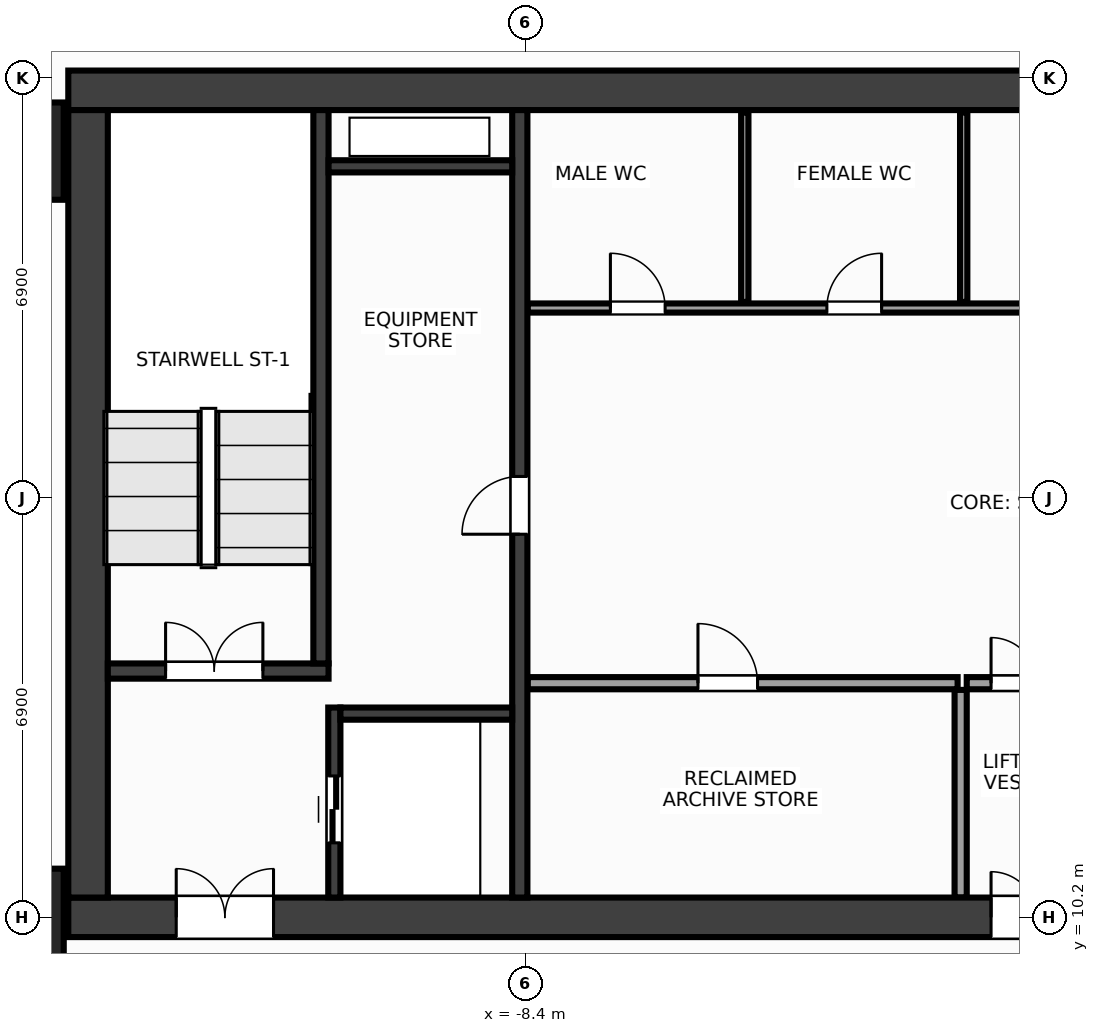
"""IFC4 building model, lengths in metres.
Left out: names, types, materials, properties, quantities, classifications, styles, units other than length and angle.
Written with IfcOpenShell. Run it as: python <this file> out.ifc"""

import sys

from ifc_helpers import new_model, si_unit, direction, frame, frame_2d, origin, origin_2d, place, context, subcontext, project, spatial, rectangle, extrude, source, transform, mapped, element, fill, save


model = new_model("IFC4")
c1 = context("Model", 3, precision=1e-05, world=origin(), true_north=direction((0.0, 1.0)))
c2 = subcontext(c1, "Body", "Model", "MODEL_VIEW")
j1 = project(units=[si_unit("LENGTHUNIT", "METRE"), si_unit("PLANEANGLEUNIT", "RADIAN")], contexts=[c1])
p1 = place(None, origin())
s1 = spatial("IfcSite", under=j1, at=p1, CompositionType="ELEMENT")
p2 = place(p1, origin())
s2 = spatial("IfcBuilding", under=s1, at=p2, CompositionType="ELEMENT")
p3 = place(p2, frame((0.0, 0.0, 110.0)))
s3 = spatial("IfcBuildingStorey", under=s2, at=p3, CompositionType="ELEMENT", Elevation=110.0)
m1 = source(origin(), c2, "Body", "SweptSolid", [
    extrude(rectangle(XDim=31.85, YDim=0.65, at=frame_2d((15.925, 0.0))), origin(), (0.0, 0.0, 1.0), 3.6),
])
p4 = place(p3, frame((-15.925, 23.8, 0.0), z_axis=(0.0, 0.0, 1.0), x_axis=(1.0, 0.0, 0.0)))
e1 = element("IfcWall", 1, at=p4, inside=s3, PredefinedType="SHEAR", context=c2, shape_type="MappedRepresentation", body=[
    mapped(m1, transform((0.0, 0.0, 0.0), x_axis=(1.0, 0.0, 0.0), y_axis=(0.0, 1.0, 0.0), z_axis=(0.0, 0.0, 1.0), scale=1.0)),
])
p5 = place(p3, frame((-15.925, 10.2, 0.0), z_axis=(0.0, 0.0, 1.0), x_axis=(1.0, 0.0, 0.0)))
e2 = element("IfcWall", 2, at=p5, inside=s3, PredefinedType="SHEAR", context=c2, shape_type="MappedRepresentation", body=[
    mapped(m1, transform((0.0, 0.0, 0.0), x_axis=(1.0, 0.0, 0.0), y_axis=(0.0, 1.0, 0.0), z_axis=(0.0, 0.0, 1.0), scale=1.0)),
])
p6 = place(p5, frame((1.775, 0.0, 0.0)))
e3 = element("IfcOpeningElement", 3, at=p6, cuts=e2, PredefinedType="OPENING", context=c2, shape_type="SweptSolid", body=[
    extrude(rectangle(XDim=1.6, YDim=2.15, at=frame_2d((0.8, 1.075))), frame((0.0, 0.337, 0.0), z_axis=(0.0, -1.0, 0.0), x_axis=(1.0, 0.0, 0.0)), (0.0, 0.0, 1.0), 0.674),
])
p7 = place(p5, frame((28.475, 0.0, 0.0)))
e4 = element("IfcOpeningElement", 4, at=p7, cuts=e2, PredefinedType="OPENING", context=c2, shape_type="SweptSolid", body=[
    extrude(rectangle(XDim=1.6, YDim=2.15, at=frame_2d((0.8, 1.075))), frame((0.0, 0.337, 0.0), z_axis=(0.0, -1.0, 0.0), x_axis=(1.0, 0.0, 0.0)), (0.0, 0.0, 1.0), 0.674),
])
p8 = place(p5, frame((15.175, 0.0, 0.0)))
e5 = element("IfcOpeningElement", 5, at=p8, cuts=e2, PredefinedType="OPENING", context=c2, shape_type="SweptSolid", body=[
    extrude(rectangle(XDim=1.5, YDim=2.2, at=frame_2d((0.75, 1.1))), frame((0.0, 0.337, 0.0), z_axis=(0.0, -1.0, 0.0), x_axis=(1.0, 0.0, 0.0)), (0.0, 0.0, 1.0), 0.674),
])
m2 = source(origin(), c2, "Body", "SweptSolid", [
    extrude(rectangle(XDim=12.95, YDim=0.65, at=frame_2d((6.475, 0.0))), origin(), (0.0, 0.0, 1.0), 3.6),
])
p9 = place(p3, frame((-15.6, 10.525, 0.0), z_axis=(0.0, 0.0, 1.0), x_axis=(0.0, 1.0, 0.0)))
e6 = element("IfcWall", 6, at=p9, inside=s3, PredefinedType="SHEAR", context=c2, shape_type="MappedRepresentation", body=[
    mapped(m2, transform((0.0, 0.0, 0.0), x_axis=(1.0, 0.0, 0.0), y_axis=(0.0, 1.0, 0.0), z_axis=(0.0, 0.0, 1.0), scale=1.0)),
])
m3 = source(origin(), c2, "Body", "SweptSolid", [
    extrude(rectangle(XDim=12.95, YDim=0.25, at=frame_2d((6.475, 0.0))), origin(), (0.0, 0.0, 1.0), 3.6),
])
p10 = place(p3, frame((-8.5, 10.525, 0.0), z_axis=(0.0, 0.0, 1.0), x_axis=(0.0, 1.0, 0.0)))
e7 = element("IfcWall", 7, at=p10, inside=s3, PredefinedType="SHEAR", context=c2, shape_type="MappedRepresentation", body=[
    mapped(m3, transform((0.0, 0.0, 0.0), x_axis=(1.0, 0.0, 0.0), y_axis=(0.0, 1.0, 0.0), z_axis=(0.0, 0.0, 1.0), scale=1.0)),
])
p11 = place(p10, frame((5.975, 0.0, 0.0)))
e8 = element("IfcOpeningElement", 8, at=p11, cuts=e7, PredefinedType="OPENING", context=c2, shape_type="SweptSolid", body=[
    extrude(rectangle(XDim=0.95, YDim=2.15, at=frame_2d((0.475, 1.075))), frame((0.0, 0.137, 0.0), z_axis=(0.0, -1.0, 0.0), x_axis=(1.0, 0.0, 0.0)), (0.0, 0.0, 1.0), 0.274),
])
m4 = source(origin(), c2, "Body", "SweptSolid", [
    extrude(rectangle(XDim=3.63, YDim=0.25, at=frame_2d((1.815, 0.0))), origin(), (0.0, 0.0, 1.0), 3.6),
])
p12 = place(p3, frame((-15.275, 14.25, 0.0), z_axis=(0.0, 0.0, 1.0), x_axis=(1.0, 0.0, 0.0)))
e9 = element("IfcWall", 9, at=p12, inside=s3, PredefinedType="SHEAR", context=c2, shape_type="MappedRepresentation", body=[
    mapped(m4, transform((0.0, 0.0, 0.0), x_axis=(1.0, 0.0, 0.0), y_axis=(0.0, 1.0, 0.0), z_axis=(0.0, 0.0, 1.0), scale=1.0)),
])
p13 = place(p12, frame((0.95, 0.0, 0.0)))
e10 = element("IfcOpeningElement", 10, at=p13, cuts=e9, PredefinedType="OPENING", context=c2, shape_type="SweptSolid", body=[
    extrude(rectangle(XDim=1.6, YDim=2.15, at=frame_2d((0.8, 1.075))), frame((0.0, 0.137, 0.0), z_axis=(0.0, -1.0, 0.0), x_axis=(1.0, 0.0, 0.0)), (0.0, 0.0, 1.0), 0.274),
])
m5 = source(origin(), c2, "Body", "SweptSolid", [
    extrude(rectangle(XDim=9.1, YDim=0.25, at=frame_2d((4.55, 0.0))), origin(), (0.0, 0.0, 1.0), 3.6),
])
p14 = place(p3, frame((-11.77, 14.375, 0.0), z_axis=(0.0, 0.0, 1.0), x_axis=(0.0, 1.0, 0.0)))
e11 = element("IfcWall", 11, at=p14, inside=s3, PredefinedType="SHEAR", context=c2, shape_type="MappedRepresentation", body=[
    mapped(m5, transform((0.0, 0.0, 0.0), x_axis=(1.0, 0.0, 0.0), y_axis=(0.0, 1.0, 0.0), z_axis=(0.0, 0.0, 1.0), scale=1.0)),
])
m6 = source(origin(), c2, "Body", "SweptSolid", [
    extrude(rectangle(XDim=3.125, YDim=0.2, at=frame_2d((1.562, 0.0))), origin(), (0.0, 0.0, 1.0), 3.6),
])
p15 = place(p3, frame((-11.55, 10.525, 0.0), z_axis=(0.0, 0.0, 1.0), x_axis=(0.0, 1.0, 0.0)))
e12 = element("IfcWall", 12, at=p15, inside=s3, PredefinedType="SHEAR", context=c2, shape_type="MappedRepresentation", body=[
    mapped(m6, transform((0.0, 0.0, 0.0), x_axis=(1.0, 0.0, 0.0), y_axis=(0.0, 1.0, 0.0), z_axis=(0.0, 0.0, 1.0), scale=1.0)),
])
p16 = place(p15, frame((0.9, 0.0, 0.0)))
e13 = element("IfcOpeningElement", 13, at=p16, cuts=e12, PredefinedType="OPENING", context=c2, shape_type="SweptSolid", body=[
    extrude(rectangle(XDim=1.1, YDim=2.15, at=frame_2d((0.55, 1.075))), frame((0.0, 0.112, 0.0), z_axis=(0.0, -1.0, 0.0), x_axis=(1.0, 0.0, 0.0)), (0.0, 0.0, 1.0), 0.224),
])
m7 = source(origin(), c2, "Body", "SweptSolid", [
    extrude(rectangle(XDim=2.825, YDim=0.2, at=frame_2d((1.413, 0.0))), origin(), (0.0, 0.0, 1.0), 3.6),
])
p17 = place(p3, frame((-11.45, 13.55, 0.0), z_axis=(0.0, 0.0, 1.0), x_axis=(1.0, 0.0, 0.0)))
e14 = element("IfcWall", 14, at=p17, inside=s3, PredefinedType="SHEAR", context=c2, shape_type="MappedRepresentation", body=[
    mapped(m7, transform((0.0, 0.0, 0.0), x_axis=(1.0, 0.0, 0.0), y_axis=(0.0, 1.0, 0.0), z_axis=(0.0, 0.0, 1.0), scale=1.0)),
])
m8 = source(origin(), c2, "Body", "SweptSolid", [
    extrude(rectangle(XDim=3.02, YDim=0.2, at=frame_2d((1.51, 0.0))), origin(), (0.0, 0.0, 1.0), 3.6),
])
p18 = place(p3, frame((-11.645, 22.55, 0.0), z_axis=(0.0, 0.0, 1.0), x_axis=(1.0, 0.0, 0.0)))
e15 = element("IfcWall", 15, at=p18, inside=s3, PredefinedType="SHEAR", context=c2, shape_type="MappedRepresentation", body=[
    mapped(m8, transform((0.0, 0.0, 0.0), x_axis=(1.0, 0.0, 0.0), y_axis=(0.0, 1.0, 0.0), z_axis=(0.0, 0.0, 1.0), scale=1.0)),
])
m9 = source(origin(), c2, "Body", "SweptSolid", [
    extrude(rectangle(XDim=1.6, YDim=1.6, at=origin_2d()), origin(), (0.0, 0.0, 1.0), 3.6),
])
for number, where, z_axis, x_axis in (
    (16, (-16.8, 10.2, 0.0), (0.0, 0.0, 1.0), (1.0, 0.0, 0.0)),
    (17, (-16.8, 22.8, 0.0), (0.0, 0.0, 1.0), (1.0, 0.0, 0.0)),
):
    element("IfcColumn", number, at=place(p3, frame(where, z_axis=z_axis, x_axis=x_axis)), inside=s3, PredefinedType="COLUMN", context=c2, shape_type="MappedRepresentation", body=[
        mapped(m9, transform((0.0, 0.0, 0.0), x_axis=(1.0, 0.0, 0.0), y_axis=(0.0, 1.0, 0.0), z_axis=(0.0, 0.0, 1.0), scale=1.0)),
    ])
m10 = source(origin(), c2, "Body", "SweptSolid", [
    extrude(rectangle(XDim=7.07, YDim=0.2, at=frame_2d((3.535, 0.0))), origin(), (0.0, 0.0, 1.0), 3.36),
])
p19 = place(p3, frame((-8.37, 14.05, 0.0), z_axis=(0.0, 0.0, 1.0), x_axis=(1.0, 0.0, 0.0)))
e18 = element("IfcWall", 18, at=p19, inside=s3, PredefinedType="PARTITIONING", context=c2, shape_type="MappedRepresentation", body=[
    mapped(m10, transform((0.0, 0.0, 0.0), x_axis=(1.0, 0.0, 0.0), y_axis=(0.0, 1.0, 0.0), z_axis=(0.0, 0.0, 1.0), scale=1.0)),
])
p20 = place(p19, frame((2.8, 0.0, 0.0)))
e19 = element("IfcOpeningElement", 19, at=p20, cuts=e18, PredefinedType="OPENING", context=c2, shape_type="SweptSolid", body=[
    extrude(rectangle(XDim=0.98, YDim=2.15, at=frame_2d((0.49, 1.075))), frame((0.0, 0.112, 0.0), z_axis=(0.0, -1.0, 0.0), x_axis=(1.0, 0.0, 0.0)), (0.0, 0.0, 1.0), 0.224),
])
m11 = source(origin(), c2, "Body", "SweptSolid", [
    extrude(rectangle(XDim=3.415, YDim=0.2, at=frame_2d((1.708, 0.0))), origin(), (0.0, 0.0, 1.0), 3.36),
])
p21 = place(p3, frame((-1.25, 10.525, 0.0), z_axis=(0.0, 0.0, 1.0), x_axis=(0.0, 1.0, 0.0)))
e20 = element("IfcWall", 20, at=p21, inside=s3, PredefinedType="PARTITIONING", context=c2, shape_type="MappedRepresentation", body=[
    mapped(m11, transform((0.0, 0.0, 0.0), x_axis=(1.0, 0.0, 0.0), y_axis=(0.0, 1.0, 0.0), z_axis=(0.0, 0.0, 1.0), scale=1.0)),
])
m12 = source(origin(), c2, "Body", "SweptSolid", [
    extrude(rectangle(XDim=2.3, YDim=0.2, at=frame_2d((1.15, 0.0))), origin(), (0.0, 0.0, 1.0), 3.36),
])
p22 = place(p3, frame((-1.15, 14.05, 0.0), z_axis=(0.0, 0.0, 1.0), x_axis=(1.0, 0.0, 0.0)))
e21 = element("IfcWall", 21, at=p22, inside=s3, PredefinedType="PARTITIONING", context=c2, shape_type="MappedRepresentation", body=[
    mapped(m12, transform((0.0, 0.0, 0.0), x_axis=(1.0, 0.0, 0.0), y_axis=(0.0, 1.0, 0.0), z_axis=(0.0, 0.0, 1.0), scale=1.0)),
])
p23 = place(p22, frame((0.4, 0.0, 0.0)))
e22 = element("IfcOpeningElement", 22, at=p23, cuts=e21, PredefinedType="OPENING", context=c2, shape_type="SweptSolid", body=[
    extrude(rectangle(XDim=1.5, YDim=2.2, at=frame_2d((0.75, 1.1))), frame((0.0, 0.112, 0.0), z_axis=(0.0, -1.0, 0.0), x_axis=(1.0, 0.0, 0.0)), (0.0, 0.0, 1.0), 0.224),
])
m13 = source(origin(), c2, "Body", "SweptSolid", [
    extrude(rectangle(XDim=14.59, YDim=0.15, at=frame_2d((7.295, 0.0))), origin(), (0.0, 0.0, 1.0), 3.36),
])
p24 = place(p3, frame((-8.37, 20.22, 0.0), z_axis=(0.0, 0.0, 1.0), x_axis=(1.0, 0.0, 0.0)))
e23 = element("IfcWall", 23, at=p24, inside=s3, PredefinedType="PARTITIONING", context=c2, shape_type="MappedRepresentation", body=[
    mapped(m13, transform((0.0, 0.0, 0.0), x_axis=(1.0, 0.0, 0.0), y_axis=(0.0, 1.0, 0.0), z_axis=(0.0, 0.0, 1.0), scale=1.0)),
])
p25 = place(p24, frame((1.36, 0.0, 0.0)))
e24 = element("IfcOpeningElement", 24, at=p25, cuts=e23, PredefinedType="OPENING", context=c2, shape_type="SweptSolid", body=[
    extrude(rectangle(XDim=0.9, YDim=2.15, at=frame_2d((0.45, 1.075))), frame((0.0, 0.087, 0.0), z_axis=(0.0, -1.0, 0.0), x_axis=(1.0, 0.0, 0.0)), (0.0, 0.0, 1.0), 0.174),
])
p26 = place(p24, frame((4.92, 0.0, 0.0)))
e25 = element("IfcOpeningElement", 25, at=p26, cuts=e23, PredefinedType="OPENING", context=c2, shape_type="SweptSolid", body=[
    extrude(rectangle(XDim=0.9, YDim=2.15, at=frame_2d((0.45, 1.075))), frame((0.0, 0.087, 0.0), z_axis=(0.0, -1.0, 0.0), x_axis=(1.0, 0.0, 0.0)), (0.0, 0.0, 1.0), 0.174),
])
p27 = place(p24, frame((10.37, 0.0, 0.0)))
e26 = element("IfcOpeningElement", 26, at=p27, cuts=e23, PredefinedType="OPENING", context=c2, shape_type="SweptSolid", body=[
    extrude(rectangle(XDim=0.9, YDim=2.15, at=frame_2d((0.45, 1.075))), frame((0.0, 0.087, 0.0), z_axis=(0.0, -1.0, 0.0), x_axis=(1.0, 0.0, 0.0)), (0.0, 0.0, 1.0), 0.174),
])
m14 = source(origin(), c2, "Body", "SweptSolid", [
    extrude(rectangle(XDim=3.115, YDim=0.12, at=frame_2d((1.558, 0.0))), origin(), (0.0, 0.0, 1.0), 3.36),
])
for number, where, z_axis, x_axis in (
    (27, (-4.8, 20.32, 0.0), (0.0, 0.0, 1.0), (0.0, 1.0, 0.0)),
    (28, (-1.2, 20.32, 0.0), (0.0, 0.0, 1.0), (0.0, 1.0, 0.0)),
):
    element("IfcWall", number, at=place(p3, frame(where, z_axis=z_axis, x_axis=x_axis)), inside=s3, PredefinedType="PARTITIONING", context=c2, shape_type="MappedRepresentation", body=[
        mapped(m14, transform((0.0, 0.0, 0.0), x_axis=(1.0, 0.0, 0.0), y_axis=(0.0, 1.0, 0.0), z_axis=(0.0, 0.0, 1.0), scale=1.0)),
    ])
m15 = source(origin(), c2, "Body", "SweptSolid", [
    extrude(rectangle(XDim=1.6, YDim=2.15, at=frame_2d((0.8, 1.075))), frame((0.0, 0.025, 0.0), z_axis=(0.0, -1.0, 0.0), x_axis=(1.0, 0.0, 0.0)), (0.0, 0.0, 1.0), 0.05),
])
p28 = place(p13, origin())
e29 = element("IfcDoor", 29, at=p28, inside=s3, OperationType="DOUBLE_DOOR_SINGLE_SWING", PredefinedType="DOOR", context=c2, shape_type="MappedRepresentation", body=[
    mapped(m15, transform((0.0, 0.0, 0.0), x_axis=(1.0, 0.0, 0.0), y_axis=(0.0, 1.0, 0.0), z_axis=(0.0, 0.0, 1.0), scale=1.0)),
])
fill(e10, e29)
p29 = place(p6, origin())
e30 = element("IfcDoor", 30, at=p29, inside=s3, OperationType="DOUBLE_DOOR_SINGLE_SWING", PredefinedType="DOOR", context=c2, shape_type="MappedRepresentation", body=[
    mapped(m15, transform((0.0, 0.0, 0.0), x_axis=(1.0, 0.0, 0.0), y_axis=(0.0, 1.0, 0.0), z_axis=(0.0, 0.0, 1.0), scale=1.0)),
])
fill(e3, e30)
m16 = source(origin(), c2, "Body", "SweptSolid", [
    extrude(rectangle(XDim=1.1, YDim=2.15, at=frame_2d((0.55, 1.075))), frame((0.0, 0.025, 0.0), z_axis=(0.0, -1.0, 0.0), x_axis=(1.0, 0.0, 0.0)), (0.0, 0.0, 1.0), 0.05),
])
p30 = place(p16, origin())
e31 = element("IfcDoor", 31, at=p30, inside=s3, OperationType="DOUBLE_DOOR_SLIDING", PredefinedType="DOOR", context=c2, shape_type="MappedRepresentation", body=[
    mapped(m16, transform((0.0, 0.0, 0.0), x_axis=(1.0, 0.0, 0.0), y_axis=(0.0, 1.0, 0.0), z_axis=(0.0, 0.0, 1.0), scale=1.0)),
])
fill(e13, e31)
m17 = source(origin(), c2, "Body", "SweptSolid", [
    extrude(rectangle(XDim=0.95, YDim=2.15, at=frame_2d((0.475, 1.075))), frame((0.0, 0.025, 0.0), z_axis=(0.0, -1.0, 0.0), x_axis=(1.0, 0.0, 0.0)), (0.0, 0.0, 1.0), 0.05),
])
p31 = place(p11, origin())
e32 = element("IfcDoor", 32, at=p31, inside=s3, OperationType="SINGLE_SWING_LEFT", PredefinedType="DOOR", context=c2, shape_type="MappedRepresentation", body=[
    mapped(m17, transform((0.0, 0.0, 0.0), x_axis=(1.0, 0.0, 0.0), y_axis=(0.0, 1.0, 0.0), z_axis=(0.0, 0.0, 1.0), scale=1.0)),
])
fill(e8, e32)
m18 = source(origin(), c2, "Body", "SweptSolid", [
    extrude(rectangle(XDim=0.98, YDim=2.15, at=frame_2d((0.49, 1.075))), frame((0.0, 0.025, 0.0), z_axis=(0.0, -1.0, 0.0), x_axis=(1.0, 0.0, 0.0)), (0.0, 0.0, 1.0), 0.05),
])
p32 = place(p20, origin())
e33 = element("IfcDoor", 33, at=p32, inside=s3, OperationType="SINGLE_SWING_LEFT", PredefinedType="DOOR", context=c2, shape_type="MappedRepresentation", body=[
    mapped(m18, transform((0.0, 0.0, 0.0), x_axis=(1.0, 0.0, 0.0), y_axis=(0.0, 1.0, 0.0), z_axis=(0.0, 0.0, 1.0), scale=1.0)),
])
fill(e19, e33)
m19 = source(origin(), c2, "Body", "SweptSolid", [
    extrude(rectangle(XDim=1.5, YDim=2.2, at=frame_2d((0.75, 1.1))), frame((0.0, 0.025, 0.0), z_axis=(0.0, -1.0, 0.0), x_axis=(1.0, 0.0, 0.0)), (0.0, 0.0, 1.0), 0.05),
])
p33 = place(p23, origin())
e34 = element("IfcDoor", 34, at=p33, inside=s3, OperationType="DOUBLE_DOOR_SINGLE_SWING", PredefinedType="DOOR", context=c2, shape_type="MappedRepresentation", body=[
    mapped(m19, transform((0.0, 0.0, 0.0), x_axis=(1.0, 0.0, 0.0), y_axis=(0.0, 1.0, 0.0), z_axis=(0.0, 0.0, 1.0), scale=1.0)),
])
fill(e22, e34)
p34 = place(p8, origin())
e35 = element("IfcDoor", 35, at=p34, inside=s3, OperationType="DOUBLE_DOOR_SINGLE_SWING", PredefinedType="DOOR", context=c2, shape_type="MappedRepresentation", body=[
    mapped(m19, transform((0.0, 0.0, 0.0), x_axis=(1.0, 0.0, 0.0), y_axis=(0.0, 1.0, 0.0), z_axis=(0.0, 0.0, 1.0), scale=1.0)),
])
fill(e5, e35)
m20 = source(origin(), c2, "Body", "SweptSolid", [
    extrude(rectangle(XDim=0.9, YDim=2.15, at=frame_2d((0.45, 1.075))), frame((0.0, 0.025, 0.0), z_axis=(0.0, -1.0, 0.0), x_axis=(1.0, 0.0, 0.0)), (0.0, 0.0, 1.0), 0.05),
])
p35 = place(p25, origin())
e36 = element("IfcDoor", 36, at=p35, inside=s3, OperationType="SINGLE_SWING_LEFT", PredefinedType="DOOR", context=c2, shape_type="MappedRepresentation", body=[
    mapped(m20, transform((0.0, 0.0, 0.0), x_axis=(1.0, 0.0, 0.0), y_axis=(0.0, 1.0, 0.0), z_axis=(0.0, 0.0, 1.0), scale=1.0)),
])
fill(e24, e36)
p36 = place(p26, origin())
e37 = element("IfcDoor", 37, at=p36, inside=s3, OperationType="SINGLE_SWING_RIGHT", PredefinedType="DOOR", context=c2, shape_type="MappedRepresentation", body=[
    mapped(m20, transform((0.0, 0.0, 0.0), x_axis=(1.0, 0.0, 0.0), y_axis=(0.0, 1.0, 0.0), z_axis=(0.0, 0.0, 1.0), scale=1.0)),
])
fill(e25, e37)
save(model, sys.argv[1])
